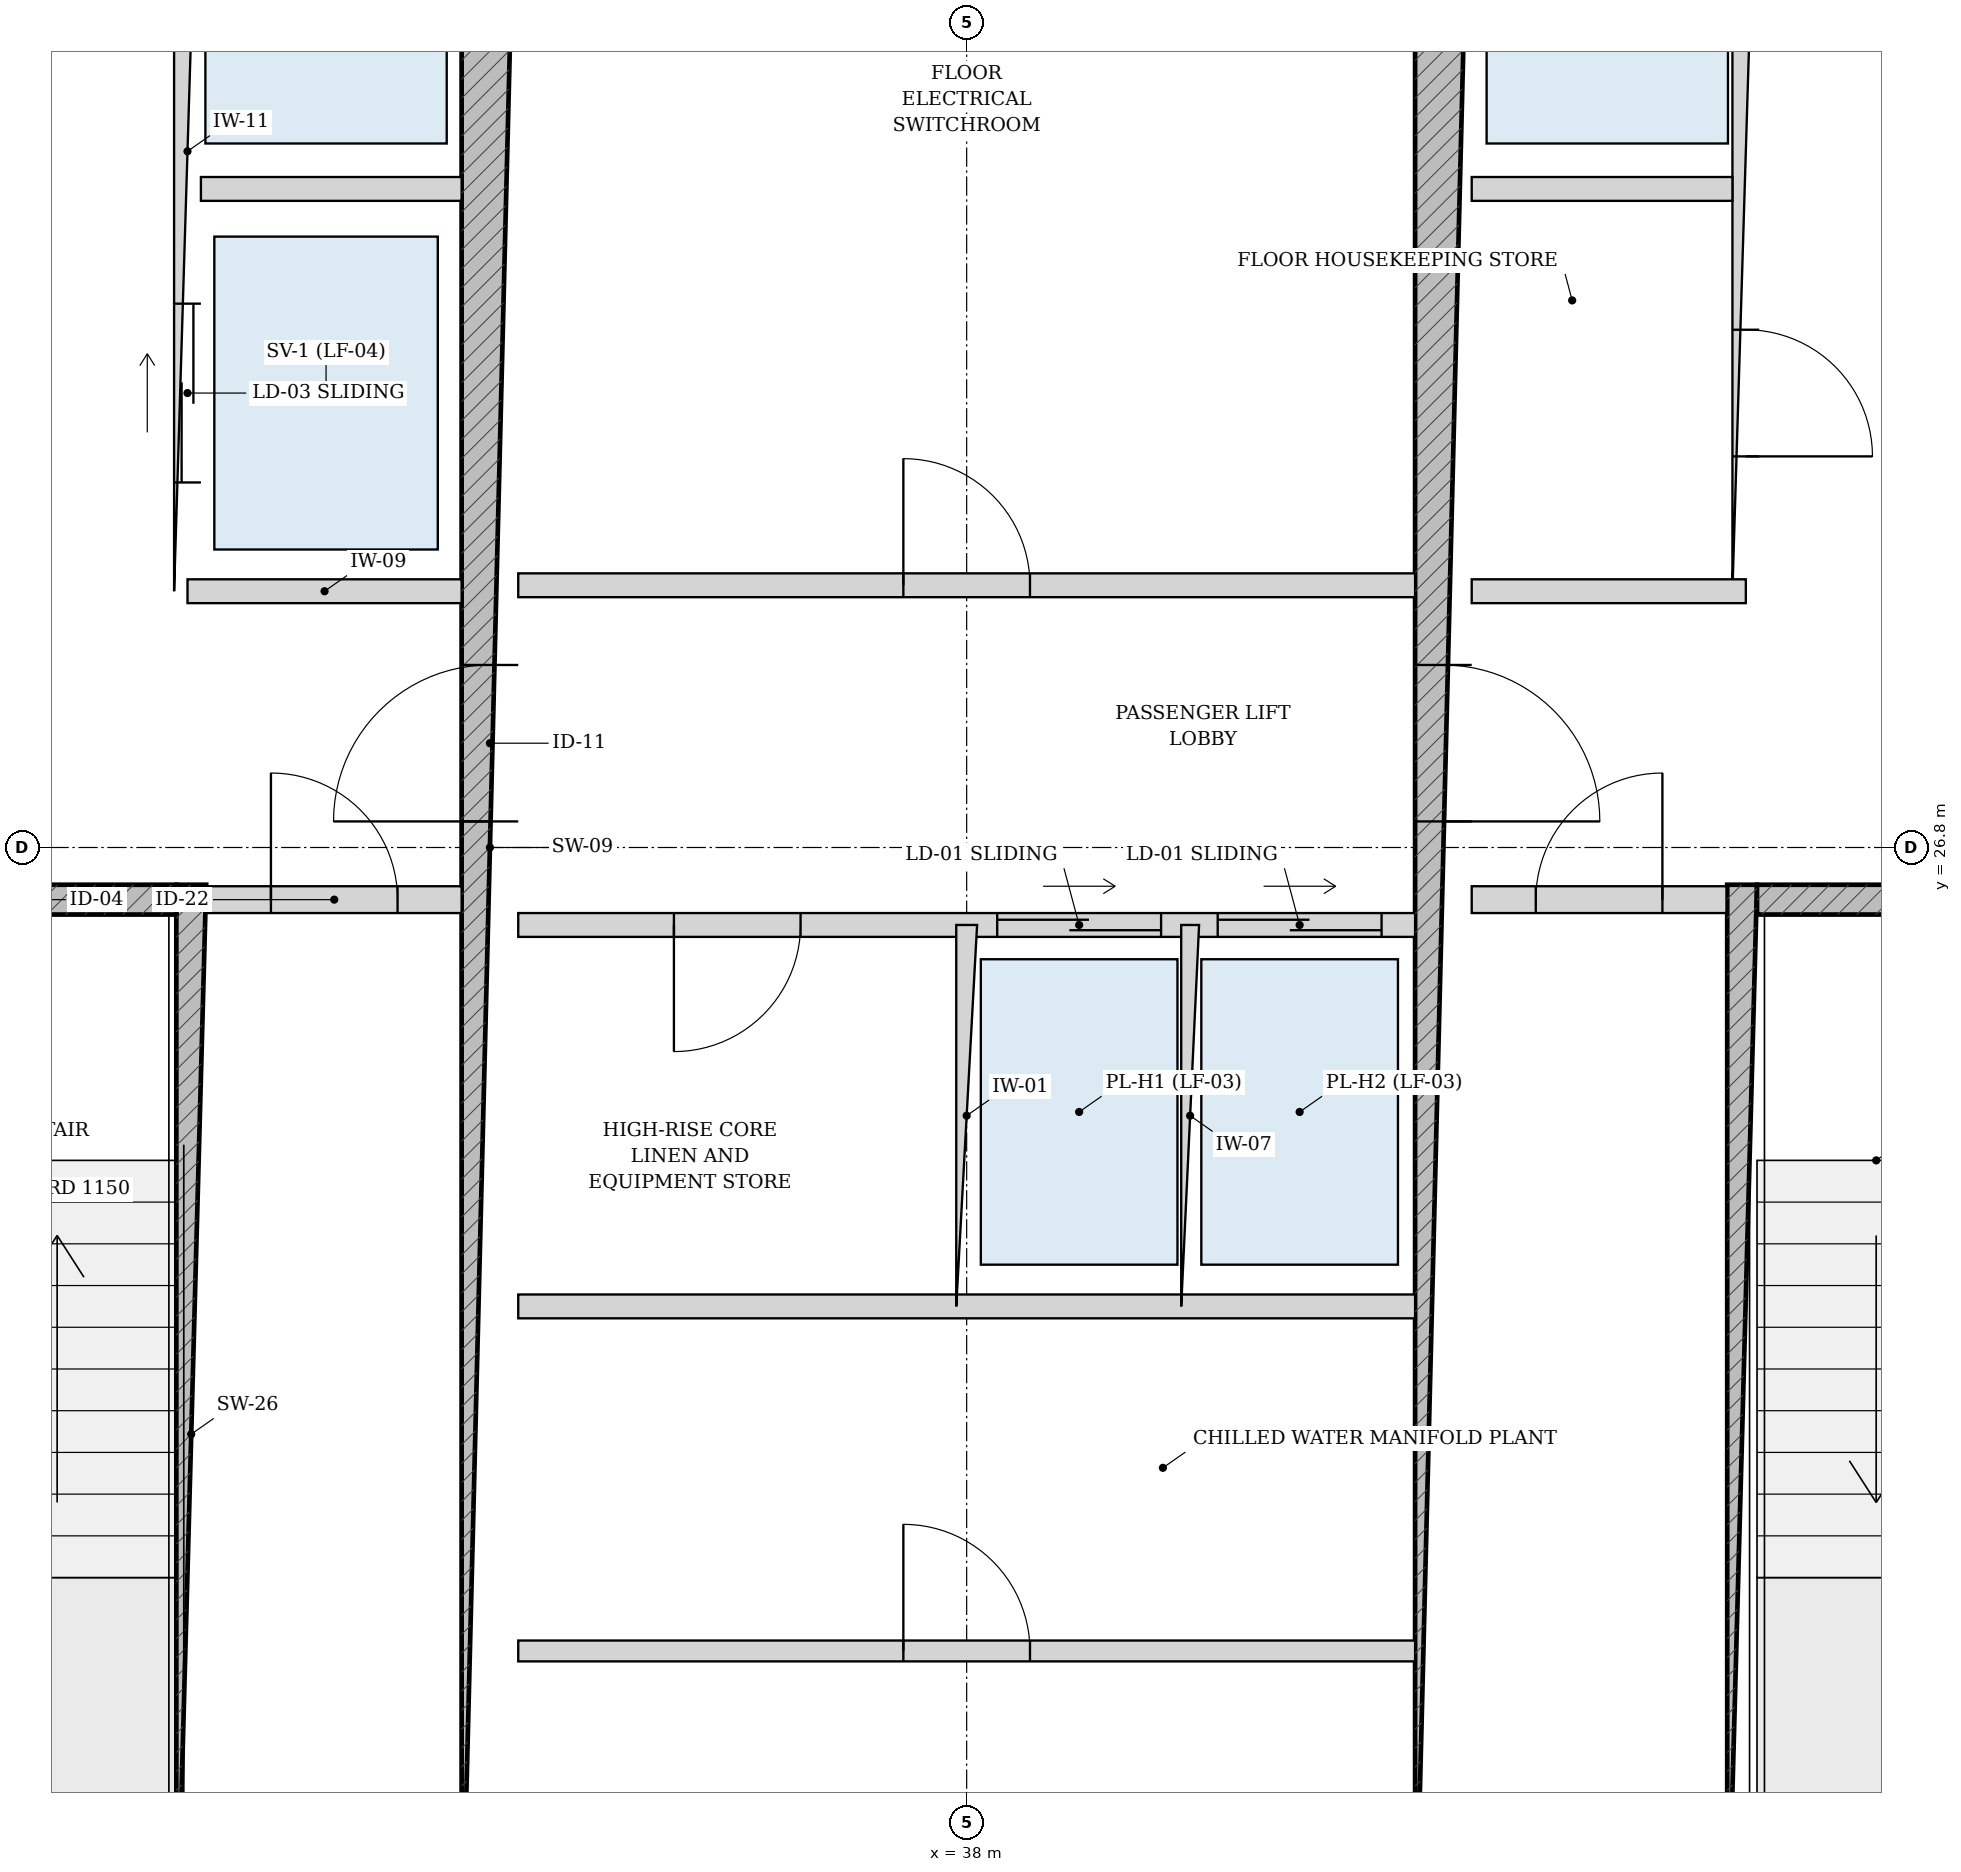
"""IFC4 building model, lengths in metres.
Left out: names, types, materials, properties, quantities, classifications, styles, units other than length and angle.
Written with IfcOpenShell. Run it as: python <this file> out.ifc"""

import sys

from ifc_helpers import new_model, si_unit, direction, frame, frame_2d, origin, place, context, subcontext, project, spatial, rectangle, extrude, source, transform, mapped, element, fill, save


model = new_model("IFC4")
c1 = context("Model", 3, precision=1e-05, world=origin(), true_north=direction((-0.2419218956, 0.970295726276)))
c2 = subcontext(c1, "Body", "Model", "MODEL_VIEW")
j1 = project(units=[si_unit("LENGTHUNIT", "METRE"), si_unit("PLANEANGLEUNIT", "RADIAN")], contexts=[c1])
p1 = place(None, origin())
s1 = spatial("IfcSite", under=j1, at=p1, CompositionType="ELEMENT")
p2 = place(p1, origin())
s2 = spatial("IfcBuilding", under=s1, at=p2, CompositionType="ELEMENT")
p3 = place(p2, frame((0.0, 0.0, 293.2)))
s3 = spatial("IfcBuildingStorey", under=s2, at=p3, CompositionType="ELEMENT", Elevation=293.2)
p4 = place(p3, frame((32.795, 19.175, 0.0), z_axis=(0.0, 0.0, 1.0), x_axis=(0.0, 1.0, 0.0)))
e1 = element("IfcWall", 1, at=p4, inside=s3, PredefinedType="SOLIDWALL", context=c2, shape_type="SweptSolid", body=[
    extrude(rectangle(XDim=7.375, YDim=0.2, at=frame_2d((3.688, 0.0))), origin(), (0.0, 0.0, 1.0), 3.49),
])
p5 = place(p3, frame((29.375, 26.45, 0.0), z_axis=(0.0, 0.0, 1.0), x_axis=(1.0, 0.0, 0.0)))
e2 = element("IfcWall", 2, at=p5, inside=s3, PredefinedType="SOLIDWALL", context=c2, shape_type="SweptSolid", body=[
    extrude(rectangle(XDim=3.32, YDim=0.2, at=frame_2d((1.66, 0.0))), origin(), (0.0, 0.0, 1.0), 3.49),
])
p6 = place(p5, frame((1.185, 0.0, 0.0)))
e3 = element("IfcOpeningElement", 3, at=p6, cuts=e2, PredefinedType="OPENING", context=c2, shape_type="SweptSolid", body=[
    extrude(rectangle(XDim=0.95, YDim=2.15, at=frame_2d((0.475, 1.075))), frame((0.0, 0.11, 0.0), z_axis=(0.0, -1.0, 0.0), x_axis=(1.0, 0.0, 0.0)), (0.0, 0.0, 1.0), 0.22),
])
p7 = place(p3, frame((43.205, 19.175, 0.0), z_axis=(0.0, 0.0, 1.0), x_axis=(0.0, 1.0, 0.0)))
e4 = element("IfcWall", 4, at=p7, inside=s3, PredefinedType="SOLIDWALL", context=c2, shape_type="SweptSolid", body=[
    extrude(rectangle(XDim=7.375, YDim=0.2, at=frame_2d((3.688, 0.0))), origin(), (0.0, 0.0, 1.0), 3.49),
])
p8 = place(p3, frame((43.305, 26.45, 0.0), z_axis=(0.0, 0.0, 1.0), x_axis=(1.0, 0.0, 0.0)))
e5 = element("IfcWall", 5, at=p8, inside=s3, PredefinedType="SOLIDWALL", context=c2, shape_type="SweptSolid", body=[
    extrude(rectangle(XDim=3.32, YDim=0.2, at=frame_2d((1.66, 0.0))), origin(), (0.0, 0.0, 1.0), 3.49),
])
p9 = place(p8, frame((1.185, 0.0, 0.0)))
e6 = element("IfcOpeningElement", 6, at=p9, cuts=e5, PredefinedType="OPENING", context=c2, shape_type="SweptSolid", body=[
    extrude(rectangle(XDim=0.95, YDim=2.15, at=frame_2d((0.475, 1.075))), frame((0.0, 0.11, 0.0), z_axis=(0.0, -1.0, 0.0), x_axis=(1.0, 0.0, 0.0)), (0.0, 0.0, 1.0), 0.22),
])
p10 = place(p3, frame((34.8, 19.175, 0.0), z_axis=(0.0, 0.0, 1.0), x_axis=(0.0, 1.0, 0.0)))
e7 = element("IfcWall", 7, at=p10, inside=s3, PredefinedType="SHEAR", context=c2, shape_type="SweptSolid", body=[
    extrude(rectangle(XDim=15.25, YDim=0.38, at=frame_2d((7.625, 0.0))), origin(), (0.0, 0.0, 1.0), 3.49),
])
p11 = place(p10, frame((7.8, 0.0, 0.0)))
e8 = element("IfcOpeningElement", 8, at=p11, cuts=e7, PredefinedType="OPENING", context=c2, shape_type="SweptSolid", body=[
    extrude(rectangle(XDim=1.05, YDim=2.15, at=frame_2d((0.525, 1.075))), frame((0.0, 0.2, 0.0), z_axis=(0.0, -1.0, 0.0), x_axis=(1.0, 0.0, 0.0)), (0.0, 0.0, 1.0), 0.4),
])
p12 = place(p3, frame((41.2, 19.175, 0.0), z_axis=(0.0, 0.0, 1.0), x_axis=(0.0, 1.0, 0.0)))
e9 = element("IfcWall", 9, at=p12, inside=s3, PredefinedType="SHEAR", context=c2, shape_type="SweptSolid", body=[
    extrude(rectangle(XDim=15.25, YDim=0.38, at=frame_2d((7.625, 0.0))), origin(), (0.0, 0.0, 1.0), 3.49),
])
p13 = place(p12, frame((7.8, 0.0, 0.0)))
e10 = element("IfcOpeningElement", 10, at=p13, cuts=e9, PredefinedType="OPENING", context=c2, shape_type="SweptSolid", body=[
    extrude(rectangle(XDim=1.05, YDim=2.15, at=frame_2d((0.525, 1.075))), frame((0.0, 0.2, 0.0), z_axis=(0.0, -1.0, 0.0), x_axis=(1.0, 0.0, 0.0)), (0.0, 0.0, 1.0), 0.4),
])
p14 = place(p3, frame((32.9, 26.45, 0.0), z_axis=(0.0, 0.0, 1.0), x_axis=(1.0, 0.0, 0.0)))
e11 = element("IfcWall", 11, at=p14, inside=s3, PredefinedType="PARTITIONING", context=c2, shape_type="SweptSolid", body=[
    extrude(rectangle(XDim=1.71, YDim=0.18, at=frame_2d((0.855, 0.0))), origin(), (0.0, 0.0, 1.0), 3.49),
])
p15 = place(p14, frame((0.43, 0.0, 0.0)))
e12 = element("IfcOpeningElement", 12, at=p15, cuts=e11, PredefinedType="OPENING", context=c2, shape_type="SweptSolid", body=[
    extrude(rectangle(XDim=0.85, YDim=2.1, at=frame_2d((0.425, 1.05))), frame((0.0, 0.1, 0.0), z_axis=(0.0, -1.0, 0.0), x_axis=(1.0, 0.0, 0.0)), (0.0, 0.0, 1.0), 0.2),
])
p16 = place(p3, frame((41.39, 26.45, 0.0), z_axis=(0.0, 0.0, 1.0), x_axis=(1.0, 0.0, 0.0)))
e13 = element("IfcWall", 13, at=p16, inside=s3, PredefinedType="PARTITIONING", context=c2, shape_type="SweptSolid", body=[
    extrude(rectangle(XDim=1.71, YDim=0.18, at=frame_2d((0.855, 0.0))), origin(), (0.0, 0.0, 1.0), 3.49),
])
p17 = place(p16, frame((0.43, 0.0, 0.0)))
e14 = element("IfcOpeningElement", 14, at=p17, cuts=e13, PredefinedType="OPENING", context=c2, shape_type="SweptSolid", body=[
    extrude(rectangle(XDim=0.85, YDim=2.1, at=frame_2d((0.425, 1.05))), frame((0.0, 0.1, 0.0), z_axis=(0.0, -1.0, 0.0), x_axis=(1.0, 0.0, 0.0)), (0.0, 0.0, 1.0), 0.2),
])
p18 = place(p3, frame((32.77, 28.52, 0.0), z_axis=(0.0, 0.0, 1.0), x_axis=(0.0, 1.0, 0.0)))
e15 = element("IfcWall", 15, at=p18, inside=s3, PredefinedType="PARTITIONING", context=c2, shape_type="SweptSolid", body=[
    extrude(rectangle(XDim=5.905, YDim=0.18, at=frame_2d((2.953, 0.0))), origin(), (0.0, 0.0, 1.0), 3.49),
])
p19 = place(p18, frame((3.655, 0.0, 0.0)))
e16 = element("IfcOpeningElement", 16, at=p19, cuts=e15, PredefinedType="OPENING", context=c2, shape_type="SweptSolid", body=[
    extrude(rectangle(XDim=1.15, YDim=2.2, at=frame_2d((0.575, 1.1))), frame((0.0, 0.1, 0.0), z_axis=(0.0, -1.0, 0.0), x_axis=(1.0, 0.0, 0.0)), (0.0, 0.0, 1.0), 0.2),
])
p20 = place(p18, frame((0.73, 0.0, 0.0)))
e17 = element("IfcOpeningElement", 17, at=p20, cuts=e15, PredefinedType="OPENING", context=c2, shape_type="SweptSolid", body=[
    extrude(rectangle(XDim=1.2, YDim=2.25, at=frame_2d((0.6, 1.125))), frame((0.0, 0.1, 0.0), z_axis=(0.0, -1.0, 0.0), x_axis=(1.0, 0.0, 0.0)), (0.0, 0.0, 1.0), 0.2),
])
p21 = place(p3, frame((32.86, 31.22, 0.0), z_axis=(0.0, 0.0, 1.0), x_axis=(1.0, 0.0, 0.0)))
e18 = element("IfcWall", 18, at=p21, inside=s3, PredefinedType="PARTITIONING", context=c2, shape_type="SweptSolid", body=[
    extrude(rectangle(XDim=1.75, YDim=0.16, at=frame_2d((0.875, 0.0))), origin(), (0.0, 0.0, 1.0), 3.49),
])
p22 = place(p3, frame((32.77, 28.52, 0.0), z_axis=(0.0, 0.0, 1.0), x_axis=(1.0, 0.0, 0.0)))
e19 = element("IfcWall", 19, at=p22, inside=s3, PredefinedType="PARTITIONING", context=c2, shape_type="SweptSolid", body=[
    extrude(rectangle(XDim=1.84, YDim=0.16, at=frame_2d((0.92, 0.0))), origin(), (0.0, 0.0, 1.0), 3.49),
])
p23 = place(p3, frame((43.23, 28.52, 0.0), z_axis=(0.0, 0.0, 1.0), x_axis=(0.0, 1.0, 0.0)))
e20 = element("IfcWall", 20, at=p23, inside=s3, PredefinedType="PARTITIONING", context=c2, shape_type="SweptSolid", body=[
    extrude(rectangle(XDim=5.905, YDim=0.18, at=frame_2d((2.953, 0.0))), origin(), (0.0, 0.0, 1.0), 3.49),
])
p24 = place(p23, frame((0.905, 0.0, 0.0)))
e21 = element("IfcOpeningElement", 21, at=p24, cuts=e20, PredefinedType="OPENING", context=c2, shape_type="SweptSolid", body=[
    extrude(rectangle(XDim=0.85, YDim=2.1, at=frame_2d((0.425, 1.05))), frame((0.0, 0.1, 0.0), z_axis=(0.0, -1.0, 0.0), x_axis=(1.0, 0.0, 0.0)), (0.0, 0.0, 1.0), 0.2),
])
p25 = place(p23, frame((3.655, 0.0, 0.0)))
e22 = element("IfcOpeningElement", 22, at=p25, cuts=e20, PredefinedType="OPENING", context=c2, shape_type="SweptSolid", body=[
    extrude(rectangle(XDim=1.15, YDim=2.2, at=frame_2d((0.575, 1.1))), frame((0.0, 0.1, 0.0), z_axis=(0.0, -1.0, 0.0), x_axis=(1.0, 0.0, 0.0)), (0.0, 0.0, 1.0), 0.2),
])
p26 = place(p3, frame((41.39, 31.22, 0.0), z_axis=(0.0, 0.0, 1.0), x_axis=(1.0, 0.0, 0.0)))
e23 = element("IfcWall", 23, at=p26, inside=s3, PredefinedType="PARTITIONING", context=c2, shape_type="SweptSolid", body=[
    extrude(rectangle(XDim=1.75, YDim=0.16, at=frame_2d((0.875, 0.0))), origin(), (0.0, 0.0, 1.0), 3.49),
])
p27 = place(p3, frame((41.39, 28.52, 0.0), z_axis=(0.0, 0.0, 1.0), x_axis=(1.0, 0.0, 0.0)))
e24 = element("IfcWall", 24, at=p27, inside=s3, PredefinedType="PARTITIONING", context=c2, shape_type="SweptSolid", body=[
    extrude(rectangle(XDim=1.84, YDim=0.16, at=frame_2d((0.92, 0.0))), origin(), (0.0, 0.0, 1.0), 3.49),
])
p28 = place(p3, frame((34.99, 28.56, 0.0), z_axis=(0.0, 0.0, 1.0), x_axis=(1.0, 0.0, 0.0)))
e25 = element("IfcWall", 25, at=p28, inside=s3, PredefinedType="PARTITIONING", context=c2, shape_type="SweptSolid", body=[
    extrude(rectangle(XDim=6.02, YDim=0.16, at=frame_2d((3.01, 0.0))), origin(), (0.0, 0.0, 1.0), 3.49),
])
p29 = place(p28, frame((2.585, 0.0, 0.0)))
e26 = element("IfcOpeningElement", 26, at=p29, cuts=e25, PredefinedType="OPENING", context=c2, shape_type="SweptSolid", body=[
    extrude(rectangle(XDim=0.85, YDim=2.1, at=frame_2d((0.425, 1.05))), frame((0.0, 0.09, 0.0), z_axis=(0.0, -1.0, 0.0), x_axis=(1.0, 0.0, 0.0)), (0.0, 0.0, 1.0), 0.18),
])
p30 = place(p3, frame((34.99, 26.28, 0.0), z_axis=(0.0, 0.0, 1.0), x_axis=(1.0, 0.0, 0.0)))
e27 = element("IfcWall", 27, at=p30, inside=s3, PredefinedType="PARTITIONING", context=c2, shape_type="SweptSolid", body=[
    extrude(rectangle(XDim=6.02, YDim=0.16, at=frame_2d((3.01, 0.0))), origin(), (0.0, 0.0, 1.0), 3.49),
])
p31 = place(p30, frame((1.045, 0.0, 0.0)))
e28 = element("IfcOpeningElement", 28, at=p31, cuts=e27, PredefinedType="OPENING", context=c2, shape_type="SweptSolid", body=[
    extrude(rectangle(XDim=0.85, YDim=2.1, at=frame_2d((0.425, 1.05))), frame((0.0, 0.09, 0.0), z_axis=(0.0, -1.0, 0.0), x_axis=(1.0, 0.0, 0.0)), (0.0, 0.0, 1.0), 0.18),
])
p32 = place(p30, frame((3.215, 0.0, 0.0)))
e29 = element("IfcOpeningElement", 29, at=p32, cuts=e27, PredefinedType="OPENING", context=c2, shape_type="SweptSolid", body=[
    extrude(rectangle(XDim=1.1, YDim=2.2, at=frame_2d((0.55, 1.1))), frame((0.0, 0.09, 0.0), z_axis=(0.0, -1.0, 0.0), x_axis=(1.0, 0.0, 0.0)), (0.0, 0.0, 1.0), 0.18),
])
p33 = place(p30, frame((4.695, 0.0, 0.0)))
e30 = element("IfcOpeningElement", 30, at=p33, cuts=e27, PredefinedType="OPENING", context=c2, shape_type="SweptSolid", body=[
    extrude(rectangle(XDim=1.1, YDim=2.2, at=frame_2d((0.55, 1.1))), frame((0.0, 0.09, 0.0), z_axis=(0.0, -1.0, 0.0), x_axis=(1.0, 0.0, 0.0)), (0.0, 0.0, 1.0), 0.18),
])
p34 = place(p3, frame((34.99, 23.72, 0.0), z_axis=(0.0, 0.0, 1.0), x_axis=(1.0, 0.0, 0.0)))
e31 = element("IfcWall", 31, at=p34, inside=s3, PredefinedType="PARTITIONING", context=c2, shape_type="SweptSolid", body=[
    extrude(rectangle(XDim=6.02, YDim=0.16, at=frame_2d((3.01, 0.0))), origin(), (0.0, 0.0, 1.0), 3.49),
])
p35 = place(p3, frame((38.0, 23.72, 0.0), z_axis=(0.0, 0.0, 1.0), x_axis=(0.0, 1.0, 0.0)))
e32 = element("IfcWall", 32, at=p35, inside=s3, PredefinedType="PARTITIONING", context=c2, shape_type="SweptSolid", body=[
    extrude(rectangle(XDim=2.56, YDim=0.14, at=frame_2d((1.28, 0.0))), origin(), (0.0, 0.0, 1.0), 3.49),
])
p36 = place(p3, frame((39.5, 23.72, 0.0), z_axis=(0.0, 0.0, 1.0), x_axis=(0.0, 1.0, 0.0)))
e33 = element("IfcWall", 33, at=p36, inside=s3, PredefinedType="PARTITIONING", context=c2, shape_type="SweptSolid", body=[
    extrude(rectangle(XDim=2.56, YDim=0.12, at=frame_2d((1.28, 0.0))), origin(), (0.0, 0.0, 1.0), 3.49),
])
p37 = place(p3, frame((34.99, 21.407, 0.0), z_axis=(0.0, 0.0, 1.0), x_axis=(1.0, 0.0, 0.0)))
e34 = element("IfcWall", 34, at=p37, inside=s3, PredefinedType="PARTITIONING", context=c2, shape_type="SweptSolid", body=[
    extrude(rectangle(XDim=6.02, YDim=0.14, at=frame_2d((3.01, 0.0))), origin(), (0.0, 0.0, 1.0), 3.49),
])
p38 = place(p37, frame((2.585, 0.0, 0.0)))
e35 = element("IfcOpeningElement", 35, at=p38, cuts=e34, PredefinedType="OPENING", context=c2, shape_type="SweptSolid", body=[
    extrude(rectangle(XDim=0.85, YDim=2.1, at=frame_2d((0.425, 1.05))), frame((0.0, 0.08, 0.0), z_axis=(0.0, -1.0, 0.0), x_axis=(1.0, 0.0, 0.0)), (0.0, 0.0, 1.0), 0.16),
])
m1 = source(origin(), c2, "Body", "SweptSolid", [
    extrude(rectangle(XDim=1.05, YDim=2.15, at=frame_2d((0.525, 1.075))), frame((0.0, 0.025, 0.0), z_axis=(0.0, -1.0, 0.0), x_axis=(1.0, 0.0, 0.0)), (0.0, 0.0, 1.0), 0.05),
])
p39 = place(p11, origin())
e36 = element("IfcDoor", 36, at=p39, inside=s3, OperationType="SINGLE_SWING_LEFT", PredefinedType="DOOR", context=c2, shape_type="MappedRepresentation", body=[
    mapped(m1, transform((0.0, 0.0, 0.0), scale=1.0)),
])
fill(e8, e36)
p40 = place(p13, frame((1.05, 0.0, 0.0), z_axis=(0.0, 0.0, 1.0), x_axis=(-1.0, 0.0, 0.0)))
e37 = element("IfcDoor", 37, at=p40, inside=s3, OperationType="SINGLE_SWING_RIGHT", PredefinedType="DOOR", context=c2, shape_type="MappedRepresentation", body=[
    mapped(m1, transform((0.0, 0.0, 0.0), scale=1.0)),
])
fill(e10, e37)
m2 = source(origin(), c2, "Body", "SweptSolid", [
    extrude(rectangle(XDim=0.85, YDim=2.1, at=frame_2d((0.425, 1.05))), frame((0.0, 0.025, 0.0), z_axis=(0.0, -1.0, 0.0), x_axis=(1.0, 0.0, 0.0)), (0.0, 0.0, 1.0), 0.05),
])
p41 = place(p15, origin())
e38 = element("IfcDoor", 38, at=p41, inside=s3, OperationType="SINGLE_SWING_LEFT", PredefinedType="DOOR", context=c2, shape_type="MappedRepresentation", body=[
    mapped(m2, transform((0.0, 0.0, 0.0), scale=1.0)),
])
fill(e12, e38)
p42 = place(p17, origin())
e39 = element("IfcDoor", 39, at=p42, inside=s3, OperationType="SINGLE_SWING_RIGHT", PredefinedType="DOOR", context=c2, shape_type="MappedRepresentation", body=[
    mapped(m2, transform((0.0, 0.0, 0.0), scale=1.0)),
])
fill(e14, e39)
p43 = place(p24, frame((0.85, 0.0, 0.0), z_axis=(0.0, 0.0, 1.0), x_axis=(-1.0, 0.0, 0.0)))
e40 = element("IfcDoor", 40, at=p43, inside=s3, OperationType="SINGLE_SWING_RIGHT", PredefinedType="DOOR", context=c2, shape_type="MappedRepresentation", body=[
    mapped(m2, transform((0.0, 0.0, 0.0), scale=1.0)),
])
fill(e21, e40)
p44 = place(p29, origin())
e41 = element("IfcDoor", 41, at=p44, inside=s3, OperationType="SINGLE_SWING_LEFT", PredefinedType="DOOR", context=c2, shape_type="MappedRepresentation", body=[
    mapped(m2, transform((0.0, 0.0, 0.0), scale=1.0)),
])
fill(e26, e41)
p45 = place(p31, frame((0.85, 0.0, 0.0), z_axis=(0.0, 0.0, 1.0), x_axis=(-1.0, 0.0, 0.0)))
e42 = element("IfcDoor", 42, at=p45, inside=s3, OperationType="SINGLE_SWING_RIGHT", PredefinedType="DOOR", context=c2, shape_type="MappedRepresentation", body=[
    mapped(m2, transform((0.0, 0.0, 0.0), scale=1.0)),
])
fill(e28, e42)
p46 = place(p38, origin())
e43 = element("IfcDoor", 43, at=p46, inside=s3, OperationType="SINGLE_SWING_LEFT", PredefinedType="DOOR", context=c2, shape_type="MappedRepresentation", body=[
    mapped(m2, transform((0.0, 0.0, 0.0), scale=1.0)),
])
fill(e35, e43)
m3 = source(origin(), c2, "Body", "SweptSolid", [
    extrude(rectangle(XDim=1.2, YDim=2.25, at=frame_2d((0.6, 1.125))), frame((0.0, 0.025, 0.0), z_axis=(0.0, -1.0, 0.0), x_axis=(1.0, 0.0, 0.0)), (0.0, 0.0, 1.0), 0.05),
])
p47 = place(p20, origin())
e44 = element("IfcDoor", 44, at=p47, inside=s3, OperationType="DOUBLE_DOOR_SLIDING", PredefinedType="DOOR", context=c2, shape_type="MappedRepresentation", body=[
    mapped(m3, transform((0.0, 0.0, 0.0), scale=1.0)),
])
fill(e17, e44)
m4 = source(origin(), c2, "Body", "SweptSolid", [
    extrude(rectangle(XDim=1.1, YDim=2.2, at=frame_2d((0.55, 1.1))), frame((0.0, 0.025, 0.0), z_axis=(0.0, -1.0, 0.0), x_axis=(1.0, 0.0, 0.0)), (0.0, 0.0, 1.0), 0.05),
])
p48 = place(p32, origin())
e45 = element("IfcDoor", 45, at=p48, inside=s3, OperationType="DOUBLE_DOOR_SLIDING", PredefinedType="DOOR", context=c2, shape_type="MappedRepresentation", body=[
    mapped(m4, transform((0.0, 0.0, 0.0), scale=1.0)),
])
fill(e29, e45)
p49 = place(p33, origin())
e46 = element("IfcDoor", 46, at=p49, inside=s3, OperationType="DOUBLE_DOOR_SLIDING", PredefinedType="DOOR", context=c2, shape_type="MappedRepresentation", body=[
    mapped(m4, transform((0.0, 0.0, 0.0), scale=1.0)),
])
fill(e30, e46)
save(model, sys.argv[1])
